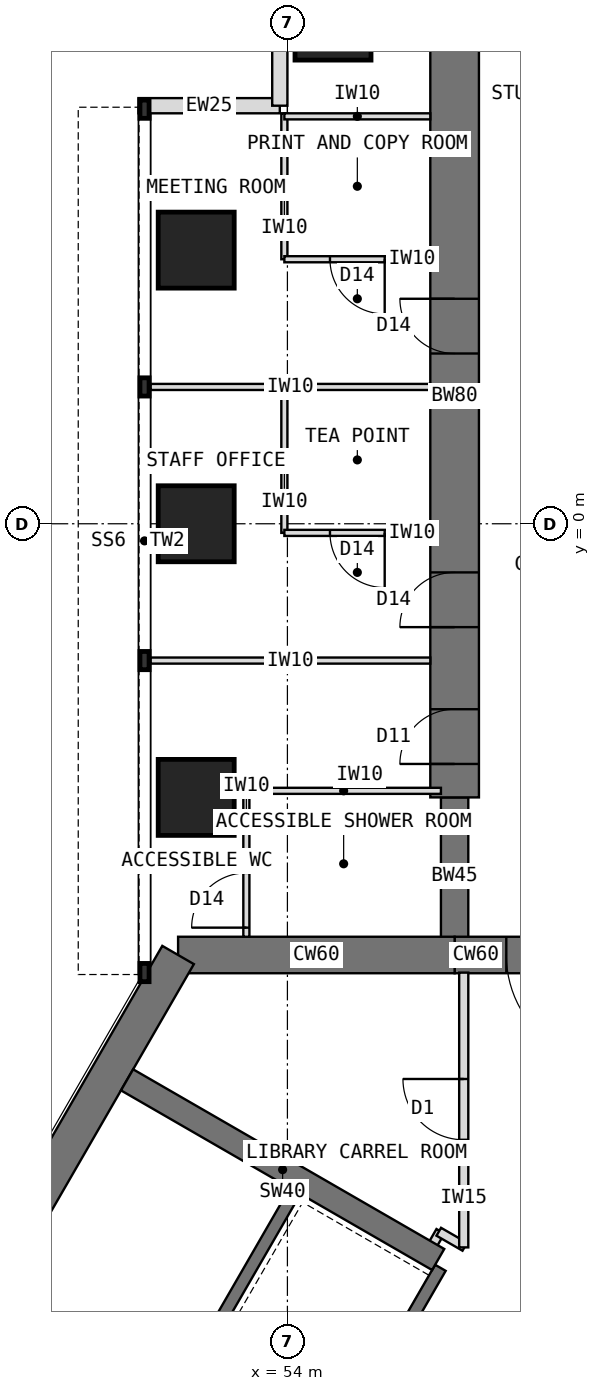
"""IFC4 building model, lengths in metres.
Left out: names, types, materials, properties, quantities, classifications, styles, units other than length and angle.
Written with IfcOpenShell. Run it as: python <this file> out.ifc"""

import sys

from ifc_helpers import new_model, si_unit, direction, frame, frame_2d, origin, origin_2d, place, context, subcontext, project, spatial, rectangle, extrude, element, fill, save


model = new_model("IFC4")
c1 = context("Model", 3, precision=1e-05, world=origin(), true_north=direction((0.0, 1.0)))
c2 = subcontext(c1, "Body", "Model", "MODEL_VIEW")
j1 = project(units=[si_unit("LENGTHUNIT", "METRE"), si_unit("PLANEANGLEUNIT", "RADIAN")], contexts=[c1])
p1 = place(None, origin())
s1 = spatial("IfcSite", under=j1, at=p1, CompositionType="ELEMENT")
p2 = place(p1, origin())
s2 = spatial("IfcBuilding", under=s1, at=p2, CompositionType="ELEMENT")
p3 = place(p2, frame((0.0, 0.0, 145.5)))
s3 = spatial("IfcBuildingStorey", under=s2, at=p3, CompositionType="ELEMENT", Elevation=145.5)
p4 = place(p3, frame((60.25, -7.092, 0.0), z_axis=(0.0, 0.0, 1.0), x_axis=(-1.0, 0.0, 0.0)))
e1 = element("IfcWall", 1, at=p4, inside=s3, PredefinedType="SHEAR", context=c2, shape_type="SweptSolid", body=[
    extrude(rectangle(XDim=3.5, YDim=0.6, at=frame_2d((1.75, 0.0))), origin(), (0.0, 0.0, 1.0), 4.0),
])
p5 = place(p4, frame((0.85, 0.0, 0.0)))
e2 = element("IfcOpeningElement", 2, at=p5, cuts=e1, PredefinedType="OPENING", context=c2, shape_type="SweptSolid", body=[
    extrude(rectangle(XDim=1.8, YDim=2.1, at=frame_2d((0.9, 1.05))), frame((0.0, 0.31, 0.0), z_axis=(0.0, -1.0, 0.0), x_axis=(1.0, 0.0, 0.0)), (0.0, 0.0, 1.0), 0.62),
])
p6 = place(p3, frame((56.75, -7.092, 0.0), z_axis=(0.0, 0.0, 1.0), x_axis=(-1.0, 0.0, 0.0)))
e3 = element("IfcWall", 3, at=p6, inside=s3, PredefinedType="SHEAR", context=c2, shape_type="SweptSolid", body=[
    extrude(rectangle(XDim=4.548, YDim=0.6, at=frame_2d((2.274, 0.0))), origin(), (0.0, 0.0, 1.0), 4.0),
])
p7 = place(p3, frame((52.202, -7.092, 0.0), z_axis=(0.0, 0.0, 1.0), x_axis=(-0.500005998175, -0.866021940709, 0.0)))
e4 = element("IfcWall", 4, at=p7, inside=s3, PredefinedType="SHEAR", context=c2, shape_type="SweptSolid", body=[
    extrude(rectangle(XDim=12.596, YDim=0.6, at=frame_2d((6.298, 0.0))), origin(), (0.0, 0.0, 1.0), 4.0),
])
p8 = place(p3, frame((56.75, -7.092, 0.0), z_axis=(0.0, 0.0, 1.0), x_axis=(0.0, 1.0, 0.0)))
e5 = element("IfcWall", 5, at=p8, inside=s3, PredefinedType="SHEAR", context=c2, shape_type="SweptSolid", body=[
    extrude(rectangle(XDim=2.592, YDim=0.45, at=frame_2d((1.296, 0.0))), origin(), (0.0, 0.0, 1.0), 4.0),
])
p9 = place(p3, frame((56.75, -4.5, 0.0), z_axis=(0.0, 0.0, 1.0), x_axis=(0.0, 1.0, 0.0)))
e6 = element("IfcWall", 6, at=p9, inside=s3, PredefinedType="SHEAR", context=c2, shape_type="SweptSolid", body=[
    extrude(rectangle(XDim=13.2, YDim=0.8, at=frame_2d((6.6, 0.0))), origin(), (0.0, 0.0, 1.0), 4.0),
])
p10 = place(p9, frame((0.55, 0.0, 0.0)))
e7 = element("IfcOpeningElement", 7, at=p10, cuts=e6, PredefinedType="OPENING", context=c2, shape_type="SweptSolid", body=[
    extrude(rectangle(XDim=0.9, YDim=2.1, at=frame_2d((0.45, 1.05))), frame((0.0, 0.41, 0.0), z_axis=(0.0, -1.0, 0.0), x_axis=(1.0, 0.0, 0.0)), (0.0, 0.0, 1.0), 0.82),
])
p11 = place(p9, frame((2.8, 0.0, 0.0)))
e8 = element("IfcOpeningElement", 8, at=p11, cuts=e6, PredefinedType="OPENING", context=c2, shape_type="SweptSolid", body=[
    extrude(rectangle(XDim=0.9, YDim=2.1, at=frame_2d((0.45, 1.05))), frame((0.0, 0.41, 0.0), z_axis=(0.0, -1.0, 0.0), x_axis=(1.0, 0.0, 0.0)), (0.0, 0.0, 1.0), 0.82),
])
p12 = place(p9, frame((7.3, 0.0, 0.0)))
e9 = element("IfcOpeningElement", 9, at=p12, cuts=e6, PredefinedType="OPENING", context=c2, shape_type="SweptSolid", body=[
    extrude(rectangle(XDim=0.9, YDim=2.1, at=frame_2d((0.45, 1.05))), frame((0.0, 0.41, 0.0), z_axis=(0.0, -1.0, 0.0), x_axis=(1.0, 0.0, 0.0)), (0.0, 0.0, 1.0), 0.82),
])
for number, where, z_axis, x_axis in (
    (10, (52.5, -4.5, 0.0), (0.0, 0.0, 1.0), (1.0, 0.0, 0.0)),
    (11, (52.5, 0.0, 0.0), (0.0, 0.0, 1.0), (1.0, 0.0, 0.0)),
    (12, (52.5, 4.5, 0.0), (0.0, 0.0, 1.0), (1.0, 0.0, 0.0)),
    (13, (54.75, 8.25, 0.0), (0.0, 0.0, 1.0), (1.0, 0.0, 0.0)),
):
    element("IfcColumn", number, at=place(p3, frame(where, z_axis=z_axis, x_axis=x_axis)), inside=s3, PredefinedType="COLUMN", context=c2, shape_type="SweptSolid", body=[
        extrude(rectangle(XDim=1.25, YDim=1.25, at=origin_2d()), origin(), (0.0, 0.0, 1.0), 4.0),
    ])
for number, where, z_axis, x_axis in (
    (14, (51.55, 6.875, 0.0), (0.0, 0.0, 1.0), (1.0, 0.0, 0.0)),
    (15, (53.875, 6.875, 0.0), (0.0, 0.0, 1.0), (0.0, 1.0, 0.0)),
):
    element("IfcWall", number, at=place(p3, frame(where, z_axis=z_axis, x_axis=x_axis)), inside=s3, PredefinedType="STANDARD", context=c2, shape_type="SweptSolid", body=[
        extrude(rectangle(XDim=2.325, YDim=0.25, at=frame_2d((1.163, 0.0))), origin(), (0.0, 0.0, 1.0), 3.8),
    ])
p13 = place(p3, frame((56.516, -12.236, 0.0), z_axis=(0.0, 0.0, 1.0), x_axis=(-0.49999894854, -0.866026010844, 0.0)))
e16 = element("IfcWall", 16, at=p13, inside=s3, PredefinedType="SHEAR", context=c2, shape_type="SweptSolid", body=[
    extrude(rectangle(XDim=8.0, YDim=0.2, at=frame_2d((4.0, 0.0))), origin(), (0.0, 0.0, 1.0), 4.0),
])
p14 = place(p13, frame((6.3, 0.0, 0.0)))
e17 = element("IfcOpeningElement", 17, at=p14, cuts=e16, PredefinedType="OPENING", context=c2, shape_type="SweptSolid", body=[
    extrude(rectangle(XDim=1.2, YDim=2.1, at=frame_2d((0.6, 1.05))), frame((0.0, 0.11, 0.0), z_axis=(0.0, -1.0, 0.0), x_axis=(1.0, 0.0, 0.0)), (0.0, 0.0, 1.0), 0.22),
])
p15 = place(p3, frame((54.178, -10.886, 0.0), z_axis=(0.0, 0.0, 1.0), x_axis=(-0.49999894854, -0.866026010844, 0.0)))
e18 = element("IfcWall", 18, at=p15, inside=s3, PredefinedType="SHEAR", context=c2, shape_type="SweptSolid", body=[
    extrude(rectangle(XDim=8.0, YDim=0.2, at=frame_2d((4.0, 0.0))), origin(), (0.0, 0.0, 1.0), 4.0),
])
p16 = place(p15, frame((6.8, 0.0, 0.0)))
e19 = element("IfcOpeningElement", 19, at=p16, cuts=e18, PredefinedType="OPENING", context=c2, shape_type="SweptSolid", body=[
    extrude(rectangle(XDim=0.9, YDim=2.1, at=frame_2d((0.45, 1.05))), frame((0.0, 0.11, 0.0), z_axis=(0.0, -1.0, 0.0), x_axis=(1.0, 0.0, 0.0)), (0.0, 0.0, 1.0), 0.22),
])
p17 = place(p3, frame((56.48, -12.099, 0.0), z_axis=(0.0, 0.0, 1.0), x_axis=(-0.866009424208, 0.500027676417, 0.0)))
e20 = element("IfcWall", 20, at=p17, inside=s3, PredefinedType="SHEAR", context=c2, shape_type="SweptSolid", body=[
    extrude(rectangle(XDim=5.908, YDim=0.4, at=frame_2d((2.954, 0.0))), origin(), (0.0, 0.0, 1.0), 4.0),
])
for number, where, z_axis, x_axis in (
    (21, (56.35, -2.25, 0.0), (0.0, 0.0, 1.0), (-1.0, 0.0, 0.0)),
    (22, (56.35, 2.25, 0.0), (0.0, 0.0, 1.0), (-1.0, 0.0, 0.0)),
):
    element("IfcWall", number, at=place(p3, frame(where, z_axis=z_axis, x_axis=x_axis)), inside=s3, PredefinedType="PARTITIONING", context=c2, shape_type="SweptSolid", body=[
        extrude(rectangle(XDim=4.6, YDim=0.1, at=frame_2d((2.3, 0.0))), origin(), (0.0, 0.0, 1.0), 3.8),
    ])
p18 = place(p3, frame((53.95, -0.15, 0.0), z_axis=(0.0, 0.0, 1.0), x_axis=(0.0, 1.0, 0.0)))
e23 = element("IfcWall", 23, at=p18, inside=s3, PredefinedType="PARTITIONING", context=c2, shape_type="SweptSolid", body=[
    extrude(rectangle(XDim=2.4, YDim=0.1, at=frame_2d((1.2, 0.0))), origin(), (0.0, 0.0, 1.0), 3.8),
])
p19 = place(p3, frame((56.35, -0.15, 0.0), z_axis=(0.0, 0.0, 1.0), x_axis=(-1.0, 0.0, 0.0)))
e24 = element("IfcWall", 24, at=p19, inside=s3, PredefinedType="PARTITIONING", context=c2, shape_type="SweptSolid", body=[
    extrude(rectangle(XDim=2.4, YDim=0.1, at=frame_2d((1.2, 0.0))), origin(), (0.0, 0.0, 1.0), 3.8),
])
p20 = place(p19, frame((0.75, 0.0, 0.0)))
e25 = element("IfcOpeningElement", 25, at=p20, cuts=e24, PredefinedType="OPENING", context=c2, shape_type="SweptSolid", body=[
    extrude(rectangle(XDim=0.9, YDim=2.1, at=frame_2d((0.45, 1.05))), frame((0.0, 0.06, 0.0), z_axis=(0.0, -1.0, 0.0), x_axis=(1.0, 0.0, 0.0)), (0.0, 0.0, 1.0), 0.12),
])
p21 = place(p3, frame((53.95, 4.35, 0.0), z_axis=(0.0, 0.0, 1.0), x_axis=(0.0, 1.0, 0.0)))
e26 = element("IfcWall", 26, at=p21, inside=s3, PredefinedType="PARTITIONING", context=c2, shape_type="SweptSolid", body=[
    extrude(rectangle(XDim=2.4, YDim=0.1, at=frame_2d((1.2, 0.0))), origin(), (0.0, 0.0, 1.0), 3.8),
])
p22 = place(p3, frame((56.35, 4.35, 0.0), z_axis=(0.0, 0.0, 1.0), x_axis=(-1.0, 0.0, 0.0)))
e27 = element("IfcWall", 27, at=p22, inside=s3, PredefinedType="PARTITIONING", context=c2, shape_type="SweptSolid", body=[
    extrude(rectangle(XDim=2.4, YDim=0.1, at=frame_2d((1.2, 0.0))), origin(), (0.0, 0.0, 1.0), 3.8),
])
p23 = place(p22, frame((0.75, 0.0, 0.0)))
e28 = element("IfcOpeningElement", 28, at=p23, cuts=e27, PredefinedType="OPENING", context=c2, shape_type="SweptSolid", body=[
    extrude(rectangle(XDim=0.9, YDim=2.1, at=frame_2d((0.45, 1.05))), frame((0.0, 0.06, 0.0), z_axis=(0.0, -1.0, 0.0), x_axis=(1.0, 0.0, 0.0)), (0.0, 0.0, 1.0), 0.12),
])
p24 = place(p3, frame((56.35, 6.7, 0.0), z_axis=(0.0, 0.0, 1.0), x_axis=(-1.0, 0.0, 0.0)))
e29 = element("IfcWall", 29, at=p24, inside=s3, PredefinedType="PARTITIONING", context=c2, shape_type="SweptSolid", body=[
    extrude(rectangle(XDim=2.4, YDim=0.1, at=frame_2d((1.2, 0.0))), origin(), (0.0, 0.0, 1.0), 3.8),
])
p25 = place(p3, frame((53.325, -6.792, 0.0), z_axis=(0.0, 0.0, 1.0), x_axis=(0.0, 1.0, 0.0)))
e30 = element("IfcWall", 30, at=p25, inside=s3, PredefinedType="PARTITIONING", context=c2, shape_type="SweptSolid", body=[
    extrude(rectangle(XDim=2.4, YDim=0.1, at=frame_2d((1.2, 0.0))), origin(), (0.0, 0.0, 1.0), 3.8),
])
p26 = place(p25, frame((0.15, 0.0, 0.0)))
e31 = element("IfcOpeningElement", 31, at=p26, cuts=e30, PredefinedType="OPENING", context=c2, shape_type="SweptSolid", body=[
    extrude(rectangle(XDim=0.9, YDim=2.1, at=frame_2d((0.45, 1.05))), frame((0.0, 0.06, 0.0), z_axis=(0.0, -1.0, 0.0), x_axis=(1.0, 0.0, 0.0)), (0.0, 0.0, 1.0), 0.12),
])
p27 = place(p3, frame((56.525, -4.392, 0.0), z_axis=(0.0, 0.0, 1.0), x_axis=(-1.0, 0.0, 0.0)))
e32 = element("IfcWall", 32, at=p27, inside=s3, PredefinedType="PARTITIONING", context=c2, shape_type="SweptSolid", body=[
    extrude(rectangle(XDim=3.2, YDim=0.1, at=frame_2d((1.6, 0.0))), origin(), (0.0, 0.0, 1.0), 3.8),
])
p28 = place(p3, frame((56.302, -12.008, 0.0), z_axis=(0.0, 0.0, 1.0), x_axis=(0.500230298122, 0.865892400268, 0.0)))
e33 = element("IfcWall", 33, at=p28, inside=s3, PredefinedType="PARTITIONING", context=c2, shape_type="SweptSolid", body=[
    extrude(rectangle(XDim=0.43, YDim=0.15, at=frame_2d((0.215, 0.0))), origin(), (0.0, 0.0, 1.0), 3.8),
])
p29 = place(p3, frame((56.489, -11.643, 0.0), z_axis=(0.0, 0.0, 1.0), x_axis=(0.865831790172, -0.50033519877, 0.0)))
e34 = element("IfcWall", 34, at=p29, inside=s3, PredefinedType="PARTITIONING", context=c2, shape_type="SweptSolid", body=[
    extrude(rectangle(XDim=0.494, YDim=0.15, at=frame_2d((0.247, 0.0))), origin(), (0.0, 0.0, 1.0), 3.8),
])
p30 = place(p3, frame((56.9, -11.9, 0.0), z_axis=(0.0, 0.0, 1.0), x_axis=(0.0, 1.0, 0.0)))
e35 = element("IfcWall", 35, at=p30, inside=s3, PredefinedType="PARTITIONING", context=c2, shape_type="SweptSolid", body=[
    extrude(rectangle(XDim=4.519, YDim=0.15, at=frame_2d((2.259, 0.0))), origin(), (0.0, 0.0, 1.0), 3.8),
])
p31 = place(p30, frame((1.769, 0.0, 0.0)))
e36 = element("IfcOpeningElement", 36, at=p31, cuts=e35, PredefinedType="OPENING", context=c2, shape_type="SweptSolid", body=[
    extrude(rectangle(XDim=1.0, YDim=2.1, at=frame_2d((0.5, 1.05))), frame((0.0, 0.085, 0.0), z_axis=(0.0, -1.0, 0.0), x_axis=(1.0, 0.0, 0.0)), (0.0, 0.0, 1.0), 0.17),
])
p32 = place(p5, origin())
e37 = element("IfcDoor", 37, at=p32, inside=s3, OperationType="DOUBLE_DOOR_DOUBLE_SWING", PredefinedType="DOOR", context=c2, shape_type="SweptSolid", body=[
    extrude(rectangle(XDim=1.72, YDim=2.06, at=frame_2d((0.9, 1.03))), frame((0.0, 0.025, 0.0), z_axis=(0.0, -1.0, 0.0), x_axis=(1.0, 0.0, 0.0)), (0.0, 0.0, 1.0), 0.05),
    extrude(rectangle(XDim=0.04, YDim=2.1, at=frame_2d((0.02, 1.05))), frame((0.0, 0.3, 0.0), z_axis=(0.0, -1.0, 0.0), x_axis=(1.0, 0.0, 0.0)), (0.0, 0.0, 1.0), 0.6),
    extrude(rectangle(XDim=0.04, YDim=2.1, at=frame_2d((1.78, 1.05))), frame((0.0, 0.3, 0.0), z_axis=(0.0, -1.0, 0.0), x_axis=(1.0, 0.0, 0.0)), (0.0, 0.0, 1.0), 0.6),
    extrude(rectangle(XDim=1.72, YDim=0.04, at=frame_2d((0.9, 2.08))), frame((0.0, 0.3, 0.0), z_axis=(0.0, -1.0, 0.0), x_axis=(1.0, 0.0, 0.0)), (0.0, 0.0, 1.0), 0.6),
])
fill(e2, e37)
p33 = place(p20, origin())
e38 = element("IfcDoor", 38, at=p33, inside=s3, OperationType="SINGLE_SWING_LEFT", PredefinedType="DOOR", context=c2, shape_type="SweptSolid", body=[
    extrude(rectangle(XDim=0.9, YDim=2.1, at=frame_2d((0.45, 1.05))), frame((0.0, 0.025, 0.0), z_axis=(0.0, -1.0, 0.0), x_axis=(1.0, 0.0, 0.0)), (0.0, 0.0, 1.0), 0.05),
])
fill(e25, e38)
p34 = place(p23, origin())
e39 = element("IfcDoor", 39, at=p34, inside=s3, OperationType="SINGLE_SWING_LEFT", PredefinedType="DOOR", context=c2, shape_type="SweptSolid", body=[
    extrude(rectangle(XDim=0.9, YDim=2.1, at=frame_2d((0.45, 1.05))), frame((0.0, 0.025, 0.0), z_axis=(0.0, -1.0, 0.0), x_axis=(1.0, 0.0, 0.0)), (0.0, 0.0, 1.0), 0.05),
])
fill(e28, e39)
p35 = place(p26, origin())
e40 = element("IfcDoor", 40, at=p35, inside=s3, OperationType="SINGLE_SWING_LEFT", PredefinedType="DOOR", context=c2, shape_type="SweptSolid", body=[
    extrude(rectangle(XDim=0.9, YDim=2.1, at=frame_2d((0.45, 1.05))), frame((0.0, 0.025, 0.0), z_axis=(0.0, -1.0, 0.0), x_axis=(1.0, 0.0, 0.0)), (0.0, 0.0, 1.0), 0.05),
])
fill(e31, e40)
p36 = place(p31, origin())
e41 = element("IfcDoor", 41, at=p36, inside=s3, OperationType="SINGLE_SWING_RIGHT", PredefinedType="DOOR", context=c2, shape_type="SweptSolid", body=[
    extrude(rectangle(XDim=1.0, YDim=2.1, at=frame_2d((0.5, 1.05))), frame((0.0, 0.025, 0.0), z_axis=(0.0, -1.0, 0.0), x_axis=(1.0, 0.0, 0.0)), (0.0, 0.0, 1.0), 0.05),
])
fill(e36, e41)
p37 = place(p10, origin())
e42 = element("IfcDoor", 42, at=p37, inside=s3, OperationType="SINGLE_SWING_LEFT", PredefinedType="DOOR", context=c2, shape_type="SweptSolid", body=[
    extrude(rectangle(XDim=0.82, YDim=2.06, at=frame_2d((0.45, 1.03))), frame((0.0, 0.025, 0.0), z_axis=(0.0, -1.0, 0.0), x_axis=(1.0, 0.0, 0.0)), (0.0, 0.0, 1.0), 0.05),
    extrude(rectangle(XDim=0.04, YDim=2.1, at=frame_2d((0.02, 1.05))), frame((0.0, 0.4, 0.0), z_axis=(0.0, -1.0, 0.0), x_axis=(1.0, 0.0, 0.0)), (0.0, 0.0, 1.0), 0.8),
    extrude(rectangle(XDim=0.04, YDim=2.1, at=frame_2d((0.88, 1.05))), frame((0.0, 0.4, 0.0), z_axis=(0.0, -1.0, 0.0), x_axis=(1.0, 0.0, 0.0)), (0.0, 0.0, 1.0), 0.8),
    extrude(rectangle(XDim=0.82, YDim=0.04, at=frame_2d((0.45, 2.08))), frame((0.0, 0.4, 0.0), z_axis=(0.0, -1.0, 0.0), x_axis=(1.0, 0.0, 0.0)), (0.0, 0.0, 1.0), 0.8),
])
fill(e7, e42)
p38 = place(p11, origin())
e43 = element("IfcDoor", 43, at=p38, inside=s3, OperationType="SINGLE_SWING_LEFT", PredefinedType="DOOR", context=c2, shape_type="SweptSolid", body=[
    extrude(rectangle(XDim=0.82, YDim=2.06, at=frame_2d((0.45, 1.03))), frame((0.0, 0.025, 0.0), z_axis=(0.0, -1.0, 0.0), x_axis=(1.0, 0.0, 0.0)), (0.0, 0.0, 1.0), 0.05),
    extrude(rectangle(XDim=0.04, YDim=2.1, at=frame_2d((0.02, 1.05))), frame((0.0, 0.4, 0.0), z_axis=(0.0, -1.0, 0.0), x_axis=(1.0, 0.0, 0.0)), (0.0, 0.0, 1.0), 0.8),
    extrude(rectangle(XDim=0.04, YDim=2.1, at=frame_2d((0.88, 1.05))), frame((0.0, 0.4, 0.0), z_axis=(0.0, -1.0, 0.0), x_axis=(1.0, 0.0, 0.0)), (0.0, 0.0, 1.0), 0.8),
    extrude(rectangle(XDim=0.82, YDim=0.04, at=frame_2d((0.45, 2.08))), frame((0.0, 0.4, 0.0), z_axis=(0.0, -1.0, 0.0), x_axis=(1.0, 0.0, 0.0)), (0.0, 0.0, 1.0), 0.8),
])
fill(e8, e43)
p39 = place(p12, origin())
e44 = element("IfcDoor", 44, at=p39, inside=s3, OperationType="SINGLE_SWING_RIGHT", PredefinedType="DOOR", context=c2, shape_type="SweptSolid", body=[
    extrude(rectangle(XDim=0.82, YDim=2.06, at=frame_2d((0.45, 1.03))), frame((0.0, 0.025, 0.0), z_axis=(0.0, -1.0, 0.0), x_axis=(1.0, 0.0, 0.0)), (0.0, 0.0, 1.0), 0.05),
    extrude(rectangle(XDim=0.04, YDim=2.1, at=frame_2d((0.02, 1.05))), frame((0.0, 0.4, 0.0), z_axis=(0.0, -1.0, 0.0), x_axis=(1.0, 0.0, 0.0)), (0.0, 0.0, 1.0), 0.8),
    extrude(rectangle(XDim=0.04, YDim=2.1, at=frame_2d((0.88, 1.05))), frame((0.0, 0.4, 0.0), z_axis=(0.0, -1.0, 0.0), x_axis=(1.0, 0.0, 0.0)), (0.0, 0.0, 1.0), 0.8),
    extrude(rectangle(XDim=0.82, YDim=0.04, at=frame_2d((0.45, 2.08))), frame((0.0, 0.4, 0.0), z_axis=(0.0, -1.0, 0.0), x_axis=(1.0, 0.0, 0.0)), (0.0, 0.0, 1.0), 0.8),
])
fill(e9, e44)
save(model, sys.argv[1])
